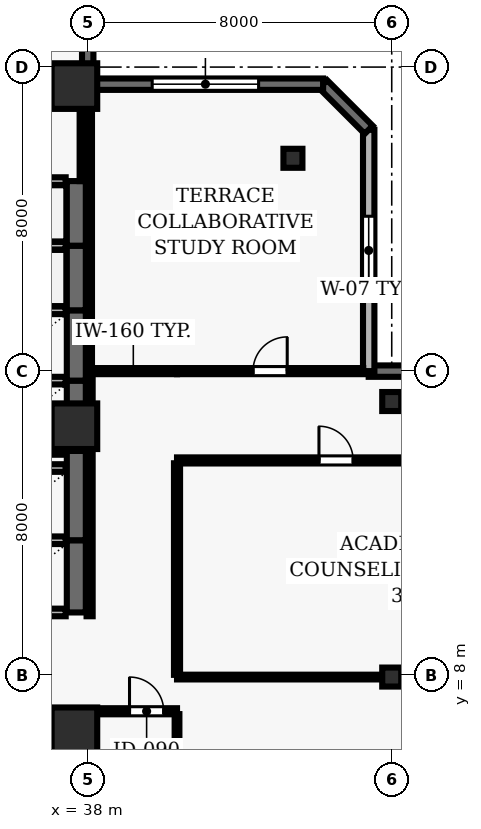
"""IFC4 building model, lengths in metres.
Left out: names, types, materials, properties, quantities, classifications, styles, units other than length and angle.
Written with IfcOpenShell. Run it as: python <this file> out.ifc"""

import sys

from ifc_helpers import new_model, si_unit, direction, frame, frame_2d, origin, origin_2d, place, context, subcontext, project, spatial, rectangle, hollow_rectangle, extrude, element, fill, save


model = new_model("IFC4")
c1 = context("Model", 3, precision=1e-05, world=origin(), true_north=direction((0.0, 1.0)))
c2 = subcontext(c1, "Body", "Model", "MODEL_VIEW")
j1 = project(units=[si_unit("LENGTHUNIT", "METRE"), si_unit("PLANEANGLEUNIT", "RADIAN")], contexts=[c1])
p1 = place(None, origin())
s1 = spatial("IfcSite", under=j1, at=p1, CompositionType="ELEMENT")
p2 = place(p1, origin())
s2 = spatial("IfcBuilding", under=s1, at=p2, CompositionType="ELEMENT")
p3 = place(p2, frame((0.0, 0.0, 154.1)))
s3 = spatial("IfcBuildingStorey", under=s2, at=p3, CompositionType="ELEMENT", Elevation=154.1)
for number, where, z_axis, x_axis in (
    (1, (37.65, 6.55, 0.0), (0.0, 0.0, 1.0), (1.0, 0.0, 0.0)),
    (2, (37.65, 14.55, 0.0), (0.0, 0.0, 1.0), (1.0, 0.0, 0.0)),
    (3, (37.65, 23.5, 0.0), (0.0, 0.0, 1.0), (1.0, 0.0, 0.0)),
):
    element("IfcColumn", number, at=place(p3, frame(where, z_axis=z_axis, x_axis=x_axis)), inside=s3, PredefinedType="COLUMN", context=c2, shape_type="SweptSolid", body=[
        extrude(rectangle(XDim=1.2, YDim=1.2, at=origin_2d()), origin(), (0.0, 0.0, 1.0), 3.9),
    ])
for number, where, z_axis, x_axis in (
    (4, (46.0, 7.95, 0.0), (0.0, 0.0, 1.0), (1.0, 0.0, 0.0)),
    (5, (46.0, 15.2, 0.0), (0.0, 0.0, 1.0), (1.0, 0.0, 0.0)),
    (6, (43.4, 21.6, 0.0), (0.0, 0.0, 1.0), (1.0, 0.0, 0.0)),
):
    element("IfcColumn", number, at=place(p3, frame(where, z_axis=z_axis, x_axis=x_axis)), inside=s3, PredefinedType="COLUMN", context=c2, shape_type="SweptSolid", body=[
        extrude(hollow_rectangle(XDim=0.5, YDim=0.5, WallThickness=0.025, at=origin_2d()), origin(), (0.0, 0.0, 1.0), 3.9),
    ])
p4 = place(p3, frame((68.1, 16.0, 0.0), z_axis=(0.0, 0.0, 1.0), x_axis=(-1.0, 0.0, 0.0)))
e7 = element("IfcWall", 7, at=p4, inside=s3, PredefinedType="SOLIDWALL", context=c2, shape_type="SweptSolid", body=[
    extrude(rectangle(XDim=22.706, YDim=0.3, at=frame_2d((11.353, 0.0))), origin(), (0.0, 0.0, 1.0), 3.69),
])
p5 = place(p4, frame((11.853, 0.0, 0.0)))
e8 = element("IfcOpeningElement", 8, at=p5, cuts=e7, PredefinedType="OPENING", context=c2, shape_type="SweptSolid", body=[
    extrude(rectangle(XDim=1.0, YDim=2.2, at=frame_2d((0.5, 1.1))), frame((0.0, 0.16, 0.0), z_axis=(0.0, -1.0, 0.0), x_axis=(1.0, 0.0, 0.0)), (0.0, 0.0, 1.0), 0.32),
])
p6 = place(p4, frame((2.088, 0.0, 0.9)))
e9 = element("IfcOpeningElement", 9, at=p6, cuts=e7, PredefinedType="OPENING", context=c2, shape_type="SweptSolid", body=[
    extrude(rectangle(XDim=1.5, YDim=1.8, at=frame_2d((0.75, 0.9))), frame((0.0, 0.16, 0.0), z_axis=(0.0, -1.0, 0.0), x_axis=(1.0, 0.0, 0.0)), (0.0, 0.0, 1.0), 0.32),
])
p7 = place(p4, frame((7.765, 0.0, 0.9)))
e10 = element("IfcOpeningElement", 10, at=p7, cuts=e7, PredefinedType="OPENING", context=c2, shape_type="SweptSolid", body=[
    extrude(rectangle(XDim=1.5, YDim=1.8, at=frame_2d((0.75, 0.9))), frame((0.0, 0.16, 0.0), z_axis=(0.0, -1.0, 0.0), x_axis=(1.0, 0.0, 0.0)), (0.0, 0.0, 1.0), 0.32),
])
p8 = place(p4, frame((13.441, 0.0, 0.9)))
e11 = element("IfcOpeningElement", 11, at=p8, cuts=e7, PredefinedType="OPENING", context=c2, shape_type="SweptSolid", body=[
    extrude(rectangle(XDim=1.5, YDim=1.8, at=frame_2d((0.75, 0.9))), frame((0.0, 0.16, 0.0), z_axis=(0.0, -1.0, 0.0), x_axis=(1.0, 0.0, 0.0)), (0.0, 0.0, 1.0), 0.32),
])
p9 = place(p4, frame((19.118, 0.0, 0.9)))
e12 = element("IfcOpeningElement", 12, at=p9, cuts=e7, PredefinedType="OPENING", context=c2, shape_type="SweptSolid", body=[
    extrude(rectangle(XDim=1.5, YDim=1.8, at=frame_2d((0.75, 0.9))), frame((0.0, 0.16, 0.0), z_axis=(0.0, -1.0, 0.0), x_axis=(1.0, 0.0, 0.0)), (0.0, 0.0, 1.0), 0.32),
])
p10 = place(p3, frame((45.394, 16.0, 0.0), z_axis=(0.0, 0.0, 1.0), x_axis=(0.0, 1.0, 0.0)))
e13 = element("IfcWall", 13, at=p10, inside=s3, PredefinedType="SOLIDWALL", context=c2, shape_type="SweptSolid", body=[
    extrude(rectangle(XDim=6.35, YDim=0.3, at=frame_2d((3.175, 0.0))), origin(), (0.0, 0.0, 1.0), 3.69),
])
p11 = place(p10, frame((2.275, 0.0, 0.9)))
e14 = element("IfcOpeningElement", 14, at=p11, cuts=e13, PredefinedType="OPENING", context=c2, shape_type="SweptSolid", body=[
    extrude(rectangle(XDim=1.8, YDim=1.8, at=frame_2d((0.9, 0.9))), frame((0.0, 0.16, 0.0), z_axis=(0.0, -1.0, 0.0), x_axis=(1.0, 0.0, 0.0)), (0.0, 0.0, 1.0), 0.32),
])
p12 = place(p3, frame((45.394, 22.35, 0.0), z_axis=(0.0, 0.0, 1.0), x_axis=(-0.707106781187, 0.707106781187, 0.0)))
e15 = element("IfcWall", 15, at=p12, inside=s3, PredefinedType="SOLIDWALL", context=c2, shape_type="SweptSolid", body=[
    extrude(rectangle(XDim=1.697, YDim=0.3, at=frame_2d((0.849, 0.0))), origin(), (0.0, 0.0, 1.0), 3.69),
])
p13 = place(p3, frame((44.194, 23.55, 0.0), z_axis=(0.0, 0.0, 1.0), x_axis=(-1.0, 0.0, 0.0)))
e16 = element("IfcWall", 16, at=p13, inside=s3, PredefinedType="SOLIDWALL", context=c2, shape_type="SweptSolid", body=[
    extrude(rectangle(XDim=6.194, YDim=0.3, at=frame_2d((3.097, 0.0))), origin(), (0.0, 0.0, 1.0), 3.69),
])
p14 = place(p13, frame((1.697, 0.0, 0.9)))
e17 = element("IfcOpeningElement", 17, at=p14, cuts=e16, PredefinedType="OPENING", context=c2, shape_type="SweptSolid", body=[
    extrude(rectangle(XDim=2.8, YDim=1.8, at=frame_2d((1.4, 0.9))), frame((0.0, 0.16, 0.0), z_axis=(0.0, -1.0, 0.0), x_axis=(1.0, 0.0, 0.0)), (0.0, 0.0, 1.0), 0.32),
])
p15 = place(p3, frame((38.0, 23.55, 0.0), z_axis=(0.0, 0.0, 1.0), x_axis=(0.0, 1.0, 0.0)))
e18 = element("IfcWall", 18, at=p15, inside=s3, PredefinedType="SOLIDWALL", context=c2, shape_type="SweptSolid", body=[
    extrude(rectangle(XDim=22.55, YDim=0.3, at=frame_2d((11.275, 0.0))), origin(), (0.0, 0.0, 1.0), 3.69),
])
p16 = place(p15, frame((8.675, 0.0, 0.0)))
e19 = element("IfcOpeningElement", 19, at=p16, cuts=e18, PredefinedType="OPENING", context=c2, shape_type="SweptSolid", body=[
    extrude(rectangle(XDim=1.0, YDim=2.2, at=frame_2d((0.5, 1.1))), frame((0.0, 0.16, 0.0), z_axis=(0.0, -1.0, 0.0), x_axis=(1.0, 0.0, 0.0)), (0.0, 0.0, 1.0), 0.32),
])
p17 = place(p15, frame((13.194, 0.0, 0.9)))
e20 = element("IfcOpeningElement", 20, at=p17, cuts=e18, PredefinedType="OPENING", context=c2, shape_type="SweptSolid", body=[
    extrude(rectangle(XDim=1.8, YDim=2.2, at=frame_2d((0.9, 1.1))), frame((0.0, 0.16, 0.0), z_axis=(0.0, -1.0, 0.0), x_axis=(1.0, 0.0, 0.0)), (0.0, 0.0, 1.0), 0.32),
])
p18 = place(p15, frame((18.831, 0.0, 0.9)))
e21 = element("IfcOpeningElement", 21, at=p18, cuts=e18, PredefinedType="OPENING", context=c2, shape_type="SweptSolid", body=[
    extrude(rectangle(XDim=1.8, YDim=2.2, at=frame_2d((0.9, 1.1))), frame((0.0, 0.16, 0.0), z_axis=(0.0, -1.0, 0.0), x_axis=(1.0, 0.0, 0.0)), (0.0, 0.0, 1.0), 0.32),
])
p19 = place(p3, frame((37.7, 4.7, 0.0), z_axis=(0.0, 0.0, 1.0), x_axis=(0.0, 1.0, 0.0)))
e22 = element("IfcWall", 22, at=p19, inside=s3, PredefinedType="SHEAR", context=c2, shape_type="SweptSolid", body=[
    extrude(rectangle(XDim=2.25, YDim=0.5, at=frame_2d((1.125, 0.0))), origin(), (0.0, 0.0, 1.0), 3.69),
])
p20 = place(p3, frame((37.42, 6.95, 0.0), z_axis=(0.0, 0.0, 1.0), x_axis=(-1.0, 0.0, 0.0)))
e23 = element("IfcWall", 23, at=p20, inside=s3, PredefinedType="SOLIDWALL", context=c2, shape_type="SweptSolid", body=[
    extrude(rectangle(XDim=2.14, YDim=0.2, at=frame_2d((1.07, 0.0))), origin(), (0.0, 0.0, 1.0), 3.69),
])
p21 = place(p3, frame((37.7, 9.65, 0.0), z_axis=(0.0, 0.0, 1.0), x_axis=(0.0, 1.0, 0.0)))
e24 = element("IfcWall", 24, at=p21, inside=s3, PredefinedType="SHEAR", context=c2, shape_type="SweptSolid", body=[
    extrude(rectangle(XDim=1.9, YDim=0.5, at=frame_2d((0.95, 0.0))), origin(), (0.0, 0.0, 1.0), 3.69),
])
for number, where, z_axis, x_axis in (
    (25, (35.28, 9.65, 0.0), (0.0, 0.0, 1.0), (1.0, 0.0, 0.0)),
    (26, (37.42, 11.55, 0.0), (0.0, 0.0, 1.0), (-1.0, 0.0, 0.0)),
):
    element("IfcWall", number, at=place(p3, frame(where, z_axis=z_axis, x_axis=x_axis)), inside=s3, PredefinedType="SOLIDWALL", context=c2, shape_type="SweptSolid", body=[
        extrude(rectangle(XDim=2.14, YDim=0.2, at=frame_2d((1.07, 0.0))), origin(), (0.0, 0.0, 1.0), 3.69),
    ])
p22 = place(p3, frame((37.7, 11.55, 0.0), z_axis=(0.0, 0.0, 1.0), x_axis=(0.0, 1.0, 0.0)))
e27 = element("IfcWall", 27, at=p22, inside=s3, PredefinedType="SHEAR", context=c2, shape_type="SweptSolid", body=[
    extrude(rectangle(XDim=2.35, YDim=0.5, at=frame_2d((1.175, 0.0))), origin(), (0.0, 0.0, 1.0), 3.69),
])
p23 = place(p3, frame((37.42, 13.45, 0.0), z_axis=(0.0, 0.0, 1.0), x_axis=(-1.0, 0.0, 0.0)))
e28 = element("IfcWall", 28, at=p23, inside=s3, PredefinedType="SOLIDWALL", context=c2, shape_type="SweptSolid", body=[
    extrude(rectangle(XDim=2.14, YDim=0.2, at=frame_2d((1.07, 0.0))), origin(), (0.0, 0.0, 1.0), 3.69),
])
p24 = place(p3, frame((37.7, 13.9, 0.0), z_axis=(0.0, 0.0, 1.0), x_axis=(0.0, 1.0, 0.0)))
e29 = element("IfcWall", 29, at=p24, inside=s3, PredefinedType="SHEAR", context=c2, shape_type="SweptSolid", body=[
    extrude(rectangle(XDim=1.85, YDim=0.5, at=frame_2d((0.925, 0.0))), origin(), (0.0, 0.0, 1.0), 3.69),
])
for number, where, z_axis, x_axis in (
    (30, (35.28, 13.9, 0.0), (0.0, 0.0, 1.0), (1.0, 0.0, 0.0)),
    (31, (37.42, 15.75, 0.0), (0.0, 0.0, 1.0), (-1.0, 0.0, 0.0)),
):
    element("IfcWall", number, at=place(p3, frame(where, z_axis=z_axis, x_axis=x_axis)), inside=s3, PredefinedType="SOLIDWALL", context=c2, shape_type="SweptSolid", body=[
        extrude(rectangle(XDim=2.14, YDim=0.2, at=frame_2d((1.07, 0.0))), origin(), (0.0, 0.0, 1.0), 3.69),
    ])
p25 = place(p3, frame((37.7, 15.75, 0.0), z_axis=(0.0, 0.0, 1.0), x_axis=(0.0, 1.0, 0.0)))
e32 = element("IfcWall", 32, at=p25, inside=s3, PredefinedType="SHEAR", context=c2, shape_type="SweptSolid", body=[
    extrude(rectangle(XDim=1.85, YDim=0.5, at=frame_2d((0.925, 0.0))), origin(), (0.0, 0.0, 1.0), 3.69),
])
p26 = place(p3, frame((37.42, 17.6, 0.0), z_axis=(0.0, 0.0, 1.0), x_axis=(-1.0, 0.0, 0.0)))
e33 = element("IfcWall", 33, at=p26, inside=s3, PredefinedType="SOLIDWALL", context=c2, shape_type="SweptSolid", body=[
    extrude(rectangle(XDim=2.14, YDim=0.2, at=frame_2d((1.07, 0.0))), origin(), (0.0, 0.0, 1.0), 3.69),
])
p27 = place(p3, frame((37.7, 17.6, 0.0), z_axis=(0.0, 0.0, 1.0), x_axis=(0.0, 1.0, 0.0)))
e34 = element("IfcWall", 34, at=p27, inside=s3, PredefinedType="SHEAR", context=c2, shape_type="SweptSolid", body=[
    extrude(rectangle(XDim=1.7, YDim=0.5, at=frame_2d((0.85, 0.0))), origin(), (0.0, 0.0, 1.0), 3.69),
])
p28 = place(p3, frame((37.42, 19.3, 0.0), z_axis=(0.0, 0.0, 1.0), x_axis=(-1.0, 0.0, 0.0)))
e35 = element("IfcWall", 35, at=p28, inside=s3, PredefinedType="SOLIDWALL", context=c2, shape_type="SweptSolid", body=[
    extrude(rectangle(XDim=2.14, YDim=0.2, at=frame_2d((1.07, 0.0))), origin(), (0.0, 0.0, 1.0), 3.69),
])
p29 = place(p3, frame((37.7, 19.3, 0.0), z_axis=(0.0, 0.0, 1.0), x_axis=(0.0, 1.0, 0.0)))
e36 = element("IfcWall", 36, at=p29, inside=s3, PredefinedType="SHEAR", context=c2, shape_type="SweptSolid", body=[
    extrude(rectangle(XDim=1.7, YDim=0.5, at=frame_2d((0.85, 0.0))), origin(), (0.0, 0.0, 1.0), 3.69),
])
p30 = place(p3, frame((37.42, 21.0, 0.0), z_axis=(0.0, 0.0, 1.0), x_axis=(-1.0, 0.0, 0.0)))
e37 = element("IfcWall", 37, at=p30, inside=s3, PredefinedType="SOLIDWALL", context=c2, shape_type="SweptSolid", body=[
    extrude(rectangle(XDim=2.14, YDim=0.2, at=frame_2d((1.07, 0.0))), origin(), (0.0, 0.0, 1.0), 3.69),
])
p31 = place(p3, frame((37.85, 23.85, 0.0), z_axis=(0.0, 0.0, 1.0), x_axis=(-1.0, 0.0, 0.0)))
e38 = element("IfcWall", 38, at=p31, inside=s3, PredefinedType="PARTITIONING", context=c2, shape_type="SweptSolid", body=[
    extrude(rectangle(XDim=4.0, YDim=0.16, at=frame_2d((2.0, 0.0))), origin(), (0.0, 0.0, 1.0), 3.073),
])
p32 = place(p31, frame((2.25, 0.0, 0.0)))
e39 = element("IfcOpeningElement", 39, at=p32, cuts=e38, PredefinedType="OPENING", context=c2, shape_type="SweptSolid", body=[
    extrude(rectangle(XDim=0.9, YDim=2.1, at=frame_2d((0.45, 1.05))), frame((0.0, 0.09, 0.0), z_axis=(0.0, -1.0, 0.0), x_axis=(1.0, 0.0, 0.0)), (0.0, 0.0, 1.0), 0.18),
])
p33 = place(p3, frame((38.05, 7.05, 0.0), z_axis=(0.0, 0.0, 1.0), x_axis=(1.0, 0.0, 0.0)))
e40 = element("IfcWall", 40, at=p33, inside=s3, PredefinedType="PARTITIONING", context=c2, shape_type="SweptSolid", body=[
    extrude(rectangle(XDim=2.3, YDim=0.16, at=frame_2d((1.15, 0.0))), origin(), (0.0, 0.0, 1.0), 3.69),
])
p34 = place(p33, frame((1.05, 0.0, 0.0)))
e41 = element("IfcOpeningElement", 41, at=p34, cuts=e40, PredefinedType="OPENING", context=c2, shape_type="SweptSolid", body=[
    extrude(rectangle(XDim=0.9, YDim=2.1, at=frame_2d((0.45, 1.05))), frame((0.0, 0.09, 0.0), z_axis=(0.0, -1.0, 0.0), x_axis=(1.0, 0.0, 0.0)), (0.0, 0.0, 1.0), 0.18),
])
p35 = place(p3, frame((40.35, 13.65, 0.0), z_axis=(0.0, 0.0, 1.0), x_axis=(1.0, 0.0, 0.0)))
e42 = element("IfcWall", 42, at=p35, inside=s3, PredefinedType="PARTITIONING", context=c2, shape_type="SweptSolid", body=[
    extrude(rectangle(XDim=9.07, YDim=0.16, at=frame_2d((4.535, 0.0))), origin(), (0.0, 0.0, 1.0), 3.69),
])
p36 = place(p35, frame((3.735, 0.0, 0.0)))
e43 = element("IfcOpeningElement", 43, at=p36, cuts=e42, PredefinedType="OPENING", context=c2, shape_type="SweptSolid", body=[
    extrude(rectangle(XDim=0.9, YDim=2.1, at=frame_2d((0.45, 1.05))), frame((0.0, 0.09, 0.0), z_axis=(0.0, -1.0, 0.0), x_axis=(1.0, 0.0, 0.0)), (0.0, 0.0, 1.0), 0.18),
])
p37 = place(p3, frame((40.35, 16.0, 0.0), z_axis=(0.0, 0.0, 1.0), x_axis=(-1.0, 0.0, 0.0)))
e44 = element("IfcWall", 44, at=p37, inside=s3, PredefinedType="PARTITIONING", context=c2, shape_type="SweptSolid", body=[
    extrude(rectangle(XDim=2.3, YDim=0.16, at=frame_2d((1.15, 0.0))), origin(), (0.0, 0.0, 1.0), 3.69),
])
p38 = place(p3, frame((40.35, 16.0, 0.0), z_axis=(0.0, 0.0, 1.0), x_axis=(1.0, 0.0, 0.0)))
e45 = element("IfcWall", 45, at=p38, inside=s3, PredefinedType="PARTITIONING", context=c2, shape_type="SweptSolid", body=[
    extrude(rectangle(XDim=4.899, YDim=0.16, at=frame_2d((2.449, 0.0))), origin(), (0.0, 0.0, 1.0), 3.69),
])
p39 = place(p38, frame((2.0, 0.0, 0.0)))
e46 = element("IfcOpeningElement", 46, at=p39, cuts=e45, PredefinedType="OPENING", context=c2, shape_type="SweptSolid", body=[
    extrude(rectangle(XDim=0.9, YDim=2.1, at=frame_2d((0.45, 1.05))), frame((0.0, 0.09, 0.0), z_axis=(0.0, -1.0, 0.0), x_axis=(1.0, 0.0, 0.0)), (0.0, 0.0, 1.0), 0.18),
])
p40 = place(p3, frame((49.42, 7.95, 0.0), z_axis=(0.0, 0.0, 1.0), x_axis=(-1.0, 0.0, 0.0)))
e47 = element("IfcWall", 47, at=p40, inside=s3, PredefinedType="PARTITIONING", context=c2, shape_type="SweptSolid", body=[
    extrude(rectangle(XDim=9.07, YDim=0.125, at=frame_2d((4.535, 0.0))), origin(), (0.0, 0.0, 1.0), 3.073),
])
p41 = place(p3, frame((37.85, 21.0, 0.0), z_axis=(0.0, 0.0, 1.0), x_axis=(0.0, 1.0, 0.0)))
e48 = element("IfcWall", 48, at=p41, inside=s3, PredefinedType="PARTITIONING", context=c2, shape_type="SweptSolid", body=[
    extrude(rectangle(XDim=2.55, YDim=0.125, at=frame_2d((1.275, 0.0))), origin(), (0.0, 0.0, 1.0), 3.073),
])
p42 = place(p3, frame((38.05, 6.975, 0.0), z_axis=(0.0, 0.0, 1.0), x_axis=(0.0, -1.0, 0.0)))
e49 = element("IfcWall", 49, at=p42, inside=s3, PredefinedType="PARTITIONING", context=c2, shape_type="SweptSolid", body=[
    extrude(rectangle(XDim=6.83, YDim=0.125, at=frame_2d((3.415, 0.0))), origin(), (0.0, 0.0, 1.0), 3.073),
])
p43 = place(p3, frame((38.05, 15.925, 0.0), z_axis=(0.0, 0.0, 1.0), x_axis=(0.0, -1.0, 0.0)))
e50 = element("IfcWall", 50, at=p43, inside=s3, PredefinedType="PARTITIONING", context=c2, shape_type="SweptSolid", body=[
    extrude(rectangle(XDim=6.375, YDim=0.16, at=frame_2d((3.188, 0.0))), origin(), (0.0, 0.0, 1.0), 3.073),
])
p44 = place(p3, frame((38.05, 23.405, 0.0), z_axis=(0.0, 0.0, 1.0), x_axis=(0.0, -1.0, 0.0)))
e51 = element("IfcWall", 51, at=p44, inside=s3, PredefinedType="PARTITIONING", context=c2, shape_type="SweptSolid", body=[
    extrude(rectangle(XDim=7.33, YDim=0.125, at=frame_2d((3.665, 0.0))), origin(), (0.0, 0.0, 1.0), 3.073),
])
p45 = place(p3, frame((40.35, 0.145, 0.0), z_axis=(0.0, 0.0, 1.0), x_axis=(0.0, 1.0, 0.0)))
e52 = element("IfcWall", 52, at=p45, inside=s3, PredefinedType="PARTITIONING", context=c2, shape_type="SweptSolid", body=[
    extrude(rectangle(XDim=6.83, YDim=0.125, at=frame_2d((3.415, 0.0))), origin(), (0.0, 0.0, 1.0), 3.69),
])
p46 = place(p45, frame((2.965, 0.0, 0.0)))
e53 = element("IfcOpeningElement", 53, at=p46, cuts=e52, PredefinedType="OPENING", context=c2, shape_type="SweptSolid", body=[
    extrude(rectangle(XDim=0.9, YDim=2.1, at=frame_2d((0.45, 1.05))), frame((0.0, 0.073, 0.0), z_axis=(0.0, -1.0, 0.0), x_axis=(1.0, 0.0, 0.0)), (0.0, 0.0, 1.0), 0.145),
])
p47 = place(p3, frame((40.35, 8.008, 0.0), z_axis=(0.0, 0.0, 1.0), x_axis=(0.0, 1.0, 0.0)))
e54 = element("IfcWall", 54, at=p47, inside=s3, PredefinedType="PARTITIONING", context=c2, shape_type="SweptSolid", body=[
    extrude(rectangle(XDim=5.567, YDim=0.16, at=frame_2d((2.783, 0.0))), origin(), (0.0, 0.0, 1.0), 3.69),
])
p48 = place(p11, origin())
e55 = element("IfcWindow", 55, at=p48, inside=s3, PartitioningType="SINGLE_PANEL", PredefinedType="WINDOW", context=c2, shape_type="SweptSolid", body=[
    extrude(rectangle(XDim=1.8, YDim=1.8, at=frame_2d((0.9, 0.9))), frame((0.0, 0.03, 0.0), z_axis=(0.0, -1.0, 0.0), x_axis=(1.0, 0.0, 0.0)), (0.0, 0.0, 1.0), 0.06),
])
fill(e14, e55)
p49 = place(p14, origin())
e56 = element("IfcWindow", 56, at=p49, inside=s3, PartitioningType="SINGLE_PANEL", PredefinedType="WINDOW", context=c2, shape_type="SweptSolid", body=[
    extrude(rectangle(XDim=2.8, YDim=1.8, at=frame_2d((1.4, 0.9))), frame((0.0, 0.03, 0.0), z_axis=(0.0, -1.0, 0.0), x_axis=(1.0, 0.0, 0.0)), (0.0, 0.0, 1.0), 0.06),
])
fill(e17, e56)
p50 = place(p34, origin())
e57 = element("IfcDoor", 57, at=p50, inside=s3, OperationType="SINGLE_SWING_LEFT", PredefinedType="DOOR", context=c2, shape_type="SweptSolid", body=[
    extrude(rectangle(XDim=0.9, YDim=2.1, at=frame_2d((0.45, 1.05))), frame((0.0, 0.025, 0.0), z_axis=(0.0, -1.0, 0.0), x_axis=(1.0, 0.0, 0.0)), (0.0, 0.0, 1.0), 0.05),
])
fill(e41, e57)
p51 = place(p36, origin())
e58 = element("IfcDoor", 58, at=p51, inside=s3, OperationType="SINGLE_SWING_LEFT", PredefinedType="DOOR", context=c2, shape_type="SweptSolid", body=[
    extrude(rectangle(XDim=0.9, YDim=2.1, at=frame_2d((0.45, 1.05))), frame((0.0, 0.025, 0.0), z_axis=(0.0, -1.0, 0.0), x_axis=(1.0, 0.0, 0.0)), (0.0, 0.0, 1.0), 0.05),
])
fill(e43, e58)
p52 = place(p39, origin())
e59 = element("IfcDoor", 59, at=p52, inside=s3, OperationType="SINGLE_SWING_RIGHT", PredefinedType="DOOR", context=c2, shape_type="SweptSolid", body=[
    extrude(rectangle(XDim=0.9, YDim=2.1, at=frame_2d((0.45, 1.05))), frame((0.0, 0.025, 0.0), z_axis=(0.0, -1.0, 0.0), x_axis=(1.0, 0.0, 0.0)), (0.0, 0.0, 1.0), 0.05),
])
fill(e46, e59)
save(model, sys.argv[1])
